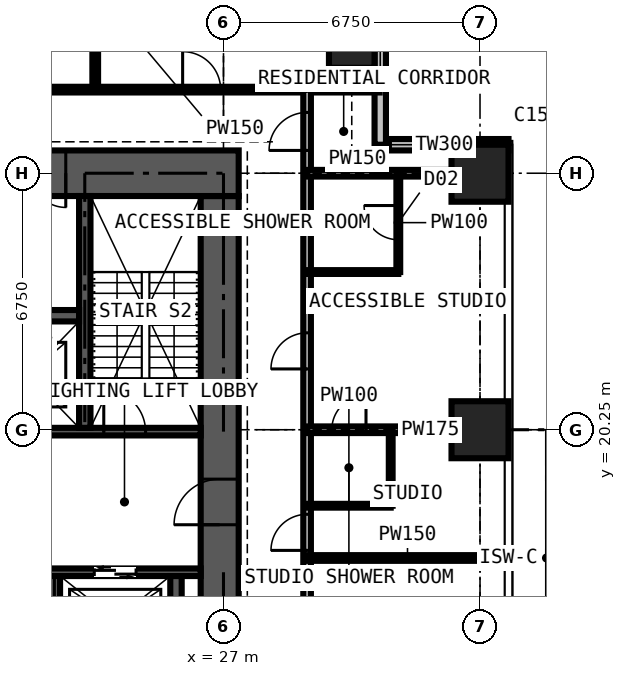
"""IFC4 building model, lengths in metres.
Left out: names, types, materials, properties, quantities, classifications, styles, units other than length and angle.
Written with IfcOpenShell. Run it as: python <this file> out.ifc"""

import sys

from ifc_helpers import new_model, si_unit, direction, frame, frame_2d, origin, origin_2d, place, context, subcontext, project, spatial, rectangle, extrude, element, fill, save


model = new_model("IFC4")
c1 = context("Model", 3, precision=1e-05, world=origin(), true_north=direction((0.0, 1.0)))
c2 = subcontext(c1, "Body", "Model", "MODEL_VIEW")
j1 = project(units=[si_unit("LENGTHUNIT", "METRE"), si_unit("PLANEANGLEUNIT", "RADIAN")], contexts=[c1])
p1 = place(None, origin())
s1 = spatial("IfcSite", under=j1, at=p1, CompositionType="ELEMENT")
p2 = place(p1, origin())
s2 = spatial("IfcBuilding", under=s1, at=p2, CompositionType="ELEMENT")
p3 = place(p2, frame((0.0, 0.0, 160.2)))
s3 = spatial("IfcBuildingStorey", under=s2, at=p3, CompositionType="ELEMENT", Elevation=160.2)
p4 = place(p3, frame((30.375, 30.375, 0.0), z_axis=(0.0, 0.0, 1.0), x_axis=(1.0, 0.0, 0.0)))
e1 = element("IfcColumn", 1, at=p4, inside=s3, PredefinedType="COLUMN", context=c2, shape_type="SweptSolid", body=[
    extrude(rectangle(XDim=1.2, YDim=1.2, at=origin_2d()), origin(), (0.0, 0.0, 1.0), 3.6),
])
for number, where, z_axis, x_axis in (
    (2, (33.75, 20.25, 0.0), (0.0, 0.0, 1.0), (1.0, 0.0, 0.0)),
    (3, (33.75, 27.0, 0.0), (0.0, 0.0, 1.0), (1.0, 0.0, 0.0)),
):
    element("IfcColumn", number, at=place(p3, frame(where, z_axis=z_axis, x_axis=x_axis)), inside=s3, PredefinedType="COLUMN", context=c2, shape_type="SweptSolid", body=[
        extrude(rectangle(XDim=1.5, YDim=1.5, at=origin_2d()), origin(), (0.0, 0.0, 1.0), 3.6),
    ])
p5 = place(p3, frame((26.9, 14.1, 0.0), z_axis=(0.0, 0.0, 1.0), x_axis=(0.0, 1.0, 0.0)))
e4 = element("IfcWall", 4, at=p5, inside=s3, PredefinedType="SHEAR", context=c2, shape_type="SweptSolid", body=[
    extrude(rectangle(XDim=12.3, YDim=1.0, at=frame_2d((6.15, 0.0))), origin(), (0.0, 0.0, 1.0), 3.6),
])
p6 = place(p5, frame((3.65, 0.0, 0.0)))
e5 = element("IfcOpeningElement", 5, at=p6, cuts=e4, PredefinedType="OPENING", context=c2, shape_type="SweptSolid", body=[
    extrude(rectangle(XDim=1.2, YDim=2.2, at=frame_2d((0.6, 1.1))), frame((0.0, 0.51, 0.0), z_axis=(0.0, -1.0, 0.0), x_axis=(1.0, 0.0, 0.0)), (0.0, 0.0, 1.0), 1.02),
])
p7 = place(p3, frame((27.4, 27.0, 0.0), z_axis=(0.0, 0.0, 1.0), x_axis=(-1.0, 0.0, 0.0)))
e6 = element("IfcWall", 6, at=p7, inside=s3, PredefinedType="SHEAR", context=c2, shape_type="SweptSolid", body=[
    extrude(rectangle(XDim=14.3, YDim=1.2, at=frame_2d((7.15, 0.0))), origin(), (0.0, 0.0, 1.0), 3.6),
])
p8 = place(p7, frame((4.55, 0.0, 0.0)))
e7 = element("IfcOpeningElement", 7, at=p8, cuts=e6, PredefinedType="OPENING", context=c2, shape_type="SweptSolid", body=[
    extrude(rectangle(XDim=0.9, YDim=2.2, at=frame_2d((0.45, 1.1))), frame((0.0, 0.61, 0.0), z_axis=(0.0, -1.0, 0.0), x_axis=(1.0, 0.0, 0.0)), (0.0, 0.0, 1.0), 1.22),
])
p9 = place(p7, frame((7.525, 0.0, 0.0)))
e8 = element("IfcOpeningElement", 8, at=p9, cuts=e6, PredefinedType="OPENING", context=c2, shape_type="SweptSolid", body=[
    extrude(rectangle(XDim=1.0, YDim=2.2, at=frame_2d((0.5, 1.1))), frame((0.0, 0.61, 0.0), z_axis=(0.0, -1.0, 0.0), x_axis=(1.0, 0.0, 0.0)), (0.0, 0.0, 1.0), 1.22),
])
p10 = place(p3, frame((34.5, 27.75, 0.0), z_axis=(0.0, 0.0, 1.0), x_axis=(-1.0, 0.0, 0.0)))
e9 = element("IfcWall", 9, at=p10, inside=s3, PredefinedType="SOLIDWALL", context=c2, shape_type="SweptSolid", body=[
    extrude(rectangle(XDim=3.375, YDim=0.3, at=frame_2d((1.688, 0.0))), origin(), (0.0, 0.0, 1.0), 3.375),
])
p11 = place(p10, frame((1.607, 0.0, 0.9)))
e10 = element("IfcOpeningElement", 10, at=p11, cuts=e9, PredefinedType="OPENING", context=c2, shape_type="SweptSolid", body=[
    extrude(rectangle(XDim=1.5, YDim=1.8, at=frame_2d((0.75, 0.9))), frame((0.0, 0.16, 0.0), z_axis=(0.0, -1.0, 0.0), x_axis=(1.0, 0.0, 0.0)), (0.0, 0.0, 1.0), 0.32),
])
p12 = place(p3, frame((31.125, 27.75, 0.0), z_axis=(0.0, 0.0, 1.0), x_axis=(0.0, 1.0, 0.0)))
e11 = element("IfcWall", 11, at=p12, inside=s3, PredefinedType="SOLIDWALL", context=c2, shape_type="SweptSolid", body=[
    extrude(rectangle(XDim=3.375, YDim=0.3, at=frame_2d((1.688, 0.0))), origin(), (0.0, 0.0, 1.0), 3.375),
])
p13 = place(p12, frame((1.663, 0.0, 0.9)))
e12 = element("IfcOpeningElement", 12, at=p13, cuts=e11, PredefinedType="OPENING", context=c2, shape_type="SweptSolid", body=[
    extrude(rectangle(XDim=1.5, YDim=1.8, at=frame_2d((0.75, 0.9))), frame((0.0, 0.16, 0.0), z_axis=(0.0, -1.0, 0.0), x_axis=(1.0, 0.0, 0.0)), (0.0, 0.0, 1.0), 0.32),
])
p14 = place(p3, frame((14.1, 16.5, 0.0), z_axis=(0.0, 0.0, 1.0), x_axis=(1.0, 0.0, 0.0)))
e13 = element("IfcWall", 13, at=p14, inside=s3, PredefinedType="SHEAR", context=c2, shape_type="SweptSolid", body=[
    extrude(rectangle(XDim=12.3, YDim=0.2, at=frame_2d((6.15, 0.0))), origin(), (0.0, 0.0, 1.0), 3.6),
])
p15 = place(p14, frame((0.9, 0.0, 0.0)))
e14 = element("IfcOpeningElement", 14, at=p15, cuts=e13, PredefinedType="OPENING", context=c2, shape_type="SweptSolid", body=[
    extrude(rectangle(XDim=1.1, YDim=2.2, at=frame_2d((0.55, 1.1))), frame((0.0, 0.11, 0.0), z_axis=(0.0, -1.0, 0.0), x_axis=(1.0, 0.0, 0.0)), (0.0, 0.0, 1.0), 0.22),
])
p16 = place(p14, frame((4.31, 0.0, 0.0)))
e15 = element("IfcOpeningElement", 15, at=p16, cuts=e13, PredefinedType="OPENING", context=c2, shape_type="SweptSolid", body=[
    extrude(rectangle(XDim=1.1, YDim=2.2, at=frame_2d((0.55, 1.1))), frame((0.0, 0.11, 0.0), z_axis=(0.0, -1.0, 0.0), x_axis=(1.0, 0.0, 0.0)), (0.0, 0.0, 1.0), 0.22),
])
p17 = place(p14, frame((6.45, 0.0, 0.0)))
e16 = element("IfcOpeningElement", 16, at=p17, cuts=e13, PredefinedType="OPENING", context=c2, shape_type="SweptSolid", body=[
    extrude(rectangle(XDim=1.1, YDim=2.2, at=frame_2d((0.55, 1.1))), frame((0.0, 0.11, 0.0), z_axis=(0.0, -1.0, 0.0), x_axis=(1.0, 0.0, 0.0)), (0.0, 0.0, 1.0), 0.22),
])
p18 = place(p14, frame((9.5, 0.0, 0.0)))
e17 = element("IfcOpeningElement", 17, at=p18, cuts=e13, PredefinedType="OPENING", context=c2, shape_type="SweptSolid", body=[
    extrude(rectangle(XDim=1.1, YDim=2.2, at=frame_2d((0.55, 1.1))), frame((0.0, 0.11, 0.0), z_axis=(0.0, -1.0, 0.0), x_axis=(1.0, 0.0, 0.0)), (0.0, 0.0, 1.0), 0.22),
])
p19 = place(p3, frame((14.1, 20.2, 0.0), z_axis=(0.0, 0.0, 1.0), x_axis=(1.0, 0.0, 0.0)))
e18 = element("IfcWall", 18, at=p19, inside=s3, PredefinedType="SHEAR", context=c2, shape_type="SweptSolid", body=[
    extrude(rectangle(XDim=12.3, YDim=0.2, at=frame_2d((6.15, 0.0))), origin(), (0.0, 0.0, 1.0), 3.6),
])
p20 = place(p19, frame((4.56, 0.0, 0.0)))
e19 = element("IfcOpeningElement", 19, at=p20, cuts=e18, PredefinedType="OPENING", context=c2, shape_type="SweptSolid", body=[
    extrude(rectangle(XDim=1.1, YDim=2.2, at=frame_2d((0.55, 1.1))), frame((0.0, 0.11, 0.0), z_axis=(0.0, -1.0, 0.0), x_axis=(1.0, 0.0, 0.0)), (0.0, 0.0, 1.0), 0.22),
])
p21 = place(p19, frame((6.7, 0.0, 0.0)))
e20 = element("IfcOpeningElement", 20, at=p21, cuts=e18, PredefinedType="OPENING", context=c2, shape_type="SweptSolid", body=[
    extrude(rectangle(XDim=1.1, YDim=2.2, at=frame_2d((0.55, 1.1))), frame((0.0, 0.11, 0.0), z_axis=(0.0, -1.0, 0.0), x_axis=(1.0, 0.0, 0.0)), (0.0, 0.0, 1.0), 0.22),
])
p22 = place(p19, frame((0.35, 0.0, 0.0)))
e21 = element("IfcOpeningElement", 21, at=p22, cuts=e18, PredefinedType="OPENING", context=c2, shape_type="SweptSolid", body=[
    extrude(rectangle(XDim=1.1, YDim=2.2, at=frame_2d((0.55, 1.1))), frame((0.0, 0.11, 0.0), z_axis=(0.0, -1.0, 0.0), x_axis=(1.0, 0.0, 0.0)), (0.0, 0.0, 1.0), 0.22),
])
p23 = place(p19, frame((9.75, 0.0, 0.0)))
e22 = element("IfcOpeningElement", 22, at=p23, cuts=e18, PredefinedType="OPENING", context=c2, shape_type="SweptSolid", body=[
    extrude(rectangle(XDim=1.1, YDim=2.2, at=frame_2d((0.55, 1.1))), frame((0.0, 0.11, 0.0), z_axis=(0.0, -1.0, 0.0), x_axis=(1.0, 0.0, 0.0)), (0.0, 0.0, 1.0), 0.22),
])
p24 = place(p3, frame((23.35, 20.3, 0.0), z_axis=(0.0, 0.0, 1.0), x_axis=(0.0, 1.0, 0.0)))
e23 = element("IfcWall", 23, at=p24, inside=s3, PredefinedType="SHEAR", context=c2, shape_type="SweptSolid", body=[
    extrude(rectangle(XDim=6.1, YDim=0.3, at=frame_2d((3.05, 0.0))), origin(), (0.0, 0.0, 1.0), 3.6),
])
p25 = place(p3, frame((17.3, 23.25, 0.0), z_axis=(0.0, 0.0, 1.0), x_axis=(1.0, 0.0, 0.0)))
e24 = element("IfcWall", 24, at=p25, inside=s3, PredefinedType="SHEAR", context=c2, shape_type="SweptSolid", body=[
    extrude(rectangle(XDim=5.9, YDim=0.3, at=frame_2d((2.95, 0.0))), origin(), (0.0, 0.0, 1.0), 3.6),
])
for number, where, z_axis, x_axis in (
    (25, (22.55, 14.1, 0.0), (0.0, 0.0, 1.0), (0.0, 1.0, 0.0)),
    (26, (25.75, 14.1, 0.0), (0.0, 0.0, 1.0), (0.0, 1.0, 0.0)),
):
    element("IfcWall", number, at=place(p3, frame(where, z_axis=z_axis, x_axis=x_axis)), inside=s3, PredefinedType="SHEAR", context=c2, shape_type="SweptSolid", body=[
        extrude(rectangle(XDim=2.3, YDim=0.3, at=frame_2d((1.15, 0.0))), origin(), (0.0, 0.0, 1.0), 3.6),
    ])
p26 = place(p3, frame((11.3, 29.2, 0.0), z_axis=(0.0, 0.0, 1.0), x_axis=(1.0, 0.0, 0.0)))
e27 = element("IfcWall", 27, at=p26, inside=s3, PredefinedType="PARTITIONING", context=c2, shape_type="SweptSolid", body=[
    extrude(rectangle(XDim=19.809, YDim=0.15, at=frame_2d((9.904, 0.0))), origin(), (0.0, 0.0, 1.0), 3.375),
])
p27 = place(p26, frame((14.625, 0.0, 0.0)))
e28 = element("IfcOpeningElement", 28, at=p27, cuts=e27, PredefinedType="OPENING", context=c2, shape_type="SweptSolid", body=[
    extrude(rectangle(XDim=1.0, YDim=2.2, at=frame_2d((0.5, 1.1))), frame((0.0, 0.085, 0.0), z_axis=(0.0, -1.0, 0.0), x_axis=(1.0, 0.0, 0.0)), (0.0, 0.0, 1.0), 0.17),
])
p28 = place(p26, frame((5.825, 0.0, 0.0)))
e29 = element("IfcOpeningElement", 29, at=p28, cuts=e27, PredefinedType="OPENING", context=c2, shape_type="SweptSolid", body=[
    extrude(rectangle(XDim=0.95, YDim=2.2, at=frame_2d((0.475, 1.1))), frame((0.0, 0.085, 0.0), z_axis=(0.0, -1.0, 0.0), x_axis=(1.0, 0.0, 0.0)), (0.0, 0.0, 1.0), 0.17),
])
p29 = place(p26, frame((9.2, 0.0, 0.0)))
e30 = element("IfcOpeningElement", 30, at=p29, cuts=e27, PredefinedType="OPENING", context=c2, shape_type="SweptSolid", body=[
    extrude(rectangle(XDim=0.95, YDim=2.2, at=frame_2d((0.475, 1.1))), frame((0.0, 0.085, 0.0), z_axis=(0.0, -1.0, 0.0), x_axis=(1.0, 0.0, 0.0)), (0.0, 0.0, 1.0), 0.17),
])
p30 = place(p26, frame((0.6, 0.0, 0.0)))
e31 = element("IfcOpeningElement", 31, at=p30, cuts=e27, PredefinedType="OPENING", context=c2, shape_type="SweptSolid", body=[
    extrude(rectangle(XDim=1.0, YDim=2.2, at=frame_2d((0.5, 1.1))), frame((0.0, 0.085, 0.0), z_axis=(0.0, -1.0, 0.0), x_axis=(1.0, 0.0, 0.0)), (0.0, 0.0, 1.0), 0.17),
])
p31 = place(p3, frame((23.625, 29.2, 0.0), z_axis=(0.0, 0.0, 1.0), x_axis=(0.0, 1.0, 0.0)))
e32 = element("IfcWall", 32, at=p31, inside=s3, PredefinedType="PARTITIONING", context=c2, shape_type="SweptSolid", body=[
    extrude(rectangle(XDim=5.284, YDim=0.15, at=frame_2d((2.642, 0.0))), origin(), (0.0, 0.0, 1.0), 3.375),
])
p32 = place(p3, frame((29.2, 11.3, 0.0), z_axis=(0.0, 0.0, 1.0), x_axis=(0.0, 1.0, 0.0)))
e33 = element("IfcWall", 33, at=p32, inside=s3, PredefinedType="PARTITIONING", context=c2, shape_type="SweptSolid", body=[
    extrude(rectangle(XDim=17.9, YDim=0.2, at=frame_2d((8.95, 0.0))), origin(), (0.0, 0.0, 1.0), 3.375),
])
p33 = place(p32, frame((10.55, 0.0, 0.0)))
e34 = element("IfcOpeningElement", 34, at=p33, cuts=e33, PredefinedType="OPENING", context=c2, shape_type="SweptSolid", body=[
    extrude(rectangle(XDim=0.95, YDim=2.2, at=frame_2d((0.475, 1.1))), frame((0.0, 0.11, 0.0), z_axis=(0.0, -1.0, 0.0), x_axis=(1.0, 0.0, 0.0)), (0.0, 0.0, 1.0), 0.22),
])
p34 = place(p32, frame((5.775, 0.0, 0.0)))
e35 = element("IfcOpeningElement", 35, at=p34, cuts=e33, PredefinedType="OPENING", context=c2, shape_type="SweptSolid", body=[
    extrude(rectangle(XDim=0.95, YDim=2.2, at=frame_2d((0.475, 1.1))), frame((0.0, 0.11, 0.0), z_axis=(0.0, -1.0, 0.0), x_axis=(1.0, 0.0, 0.0)), (0.0, 0.0, 1.0), 0.22),
])
p35 = place(p32, frame((16.3, 0.0, 0.0)))
e36 = element("IfcOpeningElement", 36, at=p35, cuts=e33, PredefinedType="OPENING", context=c2, shape_type="SweptSolid", body=[
    extrude(rectangle(XDim=1.0, YDim=2.2, at=frame_2d((0.5, 1.1))), frame((0.0, 0.11, 0.0), z_axis=(0.0, -1.0, 0.0), x_axis=(1.0, 0.0, 0.0)), (0.0, 0.0, 1.0), 0.22),
])
p36 = place(p3, frame((29.2, 16.875, 0.0), z_axis=(0.0, 0.0, 1.0), x_axis=(1.0, 0.0, 0.0)))
e37 = element("IfcWall", 37, at=p36, inside=s3, PredefinedType="PARTITIONING", context=c2, shape_type="SweptSolid", body=[
    extrude(rectangle(XDim=5.284, YDim=0.15, at=frame_2d((2.642, 0.0))), origin(), (0.0, 0.0, 1.0), 3.375),
])
p37 = place(p3, frame((29.2, 18.25, 0.0), z_axis=(0.0, 0.0, 1.0), x_axis=(1.0, 0.0, 0.0)))
e38 = element("IfcWall", 38, at=p37, inside=s3, PredefinedType="PARTITIONING", context=c2, shape_type="SweptSolid", body=[
    extrude(rectangle(XDim=2.2, YDim=0.1, at=frame_2d((1.1, 0.0))), origin(), (0.0, 0.0, 1.0), 3.375),
])
p38 = place(p3, frame((29.2, 20.25, 0.0), z_axis=(0.0, 0.0, 1.0), x_axis=(1.0, 0.0, 0.0)))
e39 = element("IfcWall", 39, at=p38, inside=s3, PredefinedType="PARTITIONING", context=c2, shape_type="SweptSolid", body=[
    extrude(rectangle(XDim=5.284, YDim=0.175, at=frame_2d((2.642, 0.0))), origin(), (0.0, 0.0, 1.0), 2.61),
])
p39 = place(p38, frame((0.65, 0.0, 0.0)))
e40 = element("IfcOpeningElement", 40, at=p39, cuts=e39, PredefinedType="OPENING", context=c2, shape_type="SweptSolid", body=[
    extrude(rectangle(XDim=0.9, YDim=2.2, at=frame_2d((0.45, 1.1))), frame((0.0, 0.097, 0.0), z_axis=(0.0, -1.0, 0.0), x_axis=(1.0, 0.0, 0.0)), (0.0, 0.0, 1.0), 0.195),
])
p40 = place(p3, frame((29.2, 24.4, 0.0), z_axis=(0.0, 0.0, 1.0), x_axis=(1.0, 0.0, 0.0)))
e41 = element("IfcWall", 41, at=p40, inside=s3, PredefinedType="PARTITIONING", context=c2, shape_type="SweptSolid", body=[
    extrude(rectangle(XDim=2.4, YDim=0.1, at=frame_2d((1.2, 0.0))), origin(), (0.0, 0.0, 1.0), 3.375),
])
p41 = place(p3, frame((29.2, 27.0, 0.0), z_axis=(0.0, 0.0, 1.0), x_axis=(1.0, 0.0, 0.0)))
e42 = element("IfcWall", 42, at=p41, inside=s3, PredefinedType="PARTITIONING", context=c2, shape_type="SweptSolid", body=[
    extrude(rectangle(XDim=5.284, YDim=0.175, at=frame_2d((2.642, 0.0))), origin(), (0.0, 0.0, 1.0), 2.806),
])
p42 = place(p3, frame((31.125, 27.0, 0.0), z_axis=(0.0, 0.0, 1.0), x_axis=(0.0, 1.0, 0.0)))
e43 = element("IfcWall", 43, at=p42, inside=s3, PredefinedType="PARTITIONING", context=c2, shape_type="SweptSolid", body=[
    extrude(rectangle(XDim=0.734, YDim=0.15, at=frame_2d((0.367, 0.0))), origin(), (0.0, 0.0, 1.0), 3.375),
])
p43 = place(p3, frame((31.4, 18.25, 0.0), z_axis=(0.0, 0.0, 1.0), x_axis=(0.0, 1.0, 0.0)))
e44 = element("IfcWall", 44, at=p43, inside=s3, PredefinedType="PARTITIONING", context=c2, shape_type="SweptSolid", body=[
    extrude(rectangle(XDim=2.0, YDim=0.1, at=frame_2d((1.0, 0.0))), origin(), (0.0, 0.0, 1.0), 3.375),
])
p44 = place(p3, frame((31.6, 24.4, 0.0), z_axis=(0.0, 0.0, 1.0), x_axis=(0.0, 1.0, 0.0)))
e45 = element("IfcWall", 45, at=p44, inside=s3, PredefinedType="PARTITIONING", context=c2, shape_type="SweptSolid", body=[
    extrude(rectangle(XDim=2.6, YDim=0.1, at=frame_2d((1.3, 0.0))), origin(), (0.0, 0.0, 1.0), 3.375),
])
p45 = place(p44, frame((0.85, 0.0, 0.0)))
e46 = element("IfcOpeningElement", 46, at=p45, cuts=e45, PredefinedType="OPENING", context=c2, shape_type="SweptSolid", body=[
    extrude(rectangle(XDim=0.9, YDim=2.2, at=frame_2d((0.45, 1.1))), frame((0.0, 0.06, 0.0), z_axis=(0.0, -1.0, 0.0), x_axis=(1.0, 0.0, 0.0)), (0.0, 0.0, 1.0), 0.12),
])
p46 = place(p11, origin())
e47 = element("IfcWindow", 47, at=p46, inside=s3, PartitioningType="SINGLE_PANEL", PredefinedType="WINDOW", context=c2, shape_type="SweptSolid", body=[
    extrude(rectangle(XDim=1.5, YDim=1.8, at=frame_2d((0.75, 0.9))), frame((0.0, 0.03, 0.0), z_axis=(0.0, -1.0, 0.0), x_axis=(1.0, 0.0, 0.0)), (0.0, 0.0, 1.0), 0.06),
])
fill(e10, e47)
p47 = place(p13, origin())
e48 = element("IfcWindow", 48, at=p47, inside=s3, PartitioningType="SINGLE_PANEL", PredefinedType="WINDOW", context=c2, shape_type="SweptSolid", body=[
    extrude(rectangle(XDim=1.5, YDim=1.8, at=frame_2d((0.75, 0.9))), frame((0.0, 0.03, 0.0), z_axis=(0.0, -1.0, 0.0), x_axis=(1.0, 0.0, 0.0)), (0.0, 0.0, 1.0), 0.06),
])
fill(e12, e48)
p48 = place(p18, origin())
e49 = element("IfcDoor", 49, at=p48, inside=s3, OperationType="DOUBLE_DOOR_SLIDING", PredefinedType="DOOR", context=c2, shape_type="SweptSolid", body=[
    extrude(rectangle(XDim=1.1, YDim=2.2, at=frame_2d((0.55, 1.1))), frame((0.0, 0.025, 0.0), z_axis=(0.0, -1.0, 0.0), x_axis=(1.0, 0.0, 0.0)), (0.0, 0.0, 1.0), 0.05),
])
fill(e17, e49)
p49 = place(p6, origin())
e50 = element("IfcDoor", 50, at=p49, inside=s3, OperationType="DOUBLE_DOOR_SINGLE_SWING", PredefinedType="DOOR", context=c2, shape_type="SweptSolid", body=[
    extrude(rectangle(XDim=1.2, YDim=2.2, at=frame_2d((0.6, 1.1))), frame((0.0, 0.025, 0.0), z_axis=(0.0, -1.0, 0.0), x_axis=(1.0, 0.0, 0.0)), (0.0, 0.0, 1.0), 0.05),
])
fill(e5, e50)
p50 = place(p8, origin())
e51 = element("IfcDoor", 51, at=p50, inside=s3, OperationType="SINGLE_SWING_LEFT", PredefinedType="DOOR", context=c2, shape_type="SweptSolid", body=[
    extrude(rectangle(XDim=0.9, YDim=2.2, at=frame_2d((0.45, 1.1))), frame((0.0, 0.4, 0.0), z_axis=(0.0, -1.0, 0.0), x_axis=(1.0, 0.0, 0.0)), (0.0, 0.0, 1.0), 0.8),
])
fill(e7, e51)
p51 = place(p23, origin())
e52 = element("IfcDoor", 52, at=p51, inside=s3, OperationType="SINGLE_SWING_LEFT", PredefinedType="DOOR", context=c2, shape_type="SweptSolid", body=[
    extrude(rectangle(XDim=1.1, YDim=2.2, at=frame_2d((0.55, 1.1))), frame((0.0, 0.025, 0.0), z_axis=(0.0, -1.0, 0.0), x_axis=(1.0, 0.0, 0.0)), (0.0, 0.0, 1.0), 0.05),
])
fill(e22, e52)
p52 = place(p33, origin())
e53 = element("IfcDoor", 53, at=p52, inside=s3, OperationType="SINGLE_SWING_LEFT", PredefinedType="DOOR", context=c2, shape_type="SweptSolid", body=[
    extrude(rectangle(XDim=0.95, YDim=2.2, at=frame_2d((0.475, 1.1))), frame((0.0, 0.025, 0.0), z_axis=(0.0, -1.0, 0.0), x_axis=(1.0, 0.0, 0.0)), (0.0, 0.0, 1.0), 0.05),
])
fill(e34, e53)
p53 = place(p45, origin())
e54 = element("IfcDoor", 54, at=p53, inside=s3, OperationType="SINGLE_SWING_RIGHT", PredefinedType="DOOR", context=c2, shape_type="SweptSolid", body=[
    extrude(rectangle(XDim=0.9, YDim=2.2, at=frame_2d((0.45, 1.1))), frame((0.0, 0.025, 0.0), z_axis=(0.0, -1.0, 0.0), x_axis=(1.0, 0.0, 0.0)), (0.0, 0.0, 1.0), 0.05),
])
fill(e46, e54)
p54 = place(p34, origin())
e55 = element("IfcDoor", 55, at=p54, inside=s3, OperationType="SINGLE_SWING_LEFT", PredefinedType="DOOR", context=c2, shape_type="SweptSolid", body=[
    extrude(rectangle(XDim=0.95, YDim=2.2, at=frame_2d((0.475, 1.1))), frame((0.0, 0.025, 0.0), z_axis=(0.0, -1.0, 0.0), x_axis=(1.0, 0.0, 0.0)), (0.0, 0.0, 1.0), 0.05),
])
fill(e35, e55)
p55 = place(p39, origin())
e56 = element("IfcDoor", 56, at=p55, inside=s3, OperationType="SINGLE_SWING_RIGHT", PredefinedType="DOOR", context=c2, shape_type="SweptSolid", body=[
    extrude(rectangle(XDim=0.9, YDim=2.2, at=frame_2d((0.45, 1.1))), frame((0.0, 0.025, 0.0), z_axis=(0.0, -1.0, 0.0), x_axis=(1.0, 0.0, 0.0)), (0.0, 0.0, 1.0), 0.05),
])
fill(e40, e56)
p56 = place(p35, origin())
e57 = element("IfcDoor", 57, at=p56, inside=s3, OperationType="SINGLE_SWING_LEFT", PredefinedType="DOOR", context=c2, shape_type="SweptSolid", body=[
    extrude(rectangle(XDim=1.0, YDim=2.2, at=frame_2d((0.5, 1.1))), frame((0.0, 0.025, 0.0), z_axis=(0.0, -1.0, 0.0), x_axis=(1.0, 0.0, 0.0)), (0.0, 0.0, 1.0), 0.05),
])
fill(e36, e57)
p57 = place(p27, origin())
e58 = element("IfcDoor", 58, at=p57, inside=s3, OperationType="SINGLE_SWING_LEFT", PredefinedType="DOOR", context=c2, shape_type="SweptSolid", body=[
    extrude(rectangle(XDim=1.0, YDim=2.2, at=frame_2d((0.5, 1.1))), frame((0.0, 0.025, 0.0), z_axis=(0.0, -1.0, 0.0), x_axis=(1.0, 0.0, 0.0)), (0.0, 0.0, 1.0), 0.05),
])
fill(e28, e58)
save(model, sys.argv[1])
